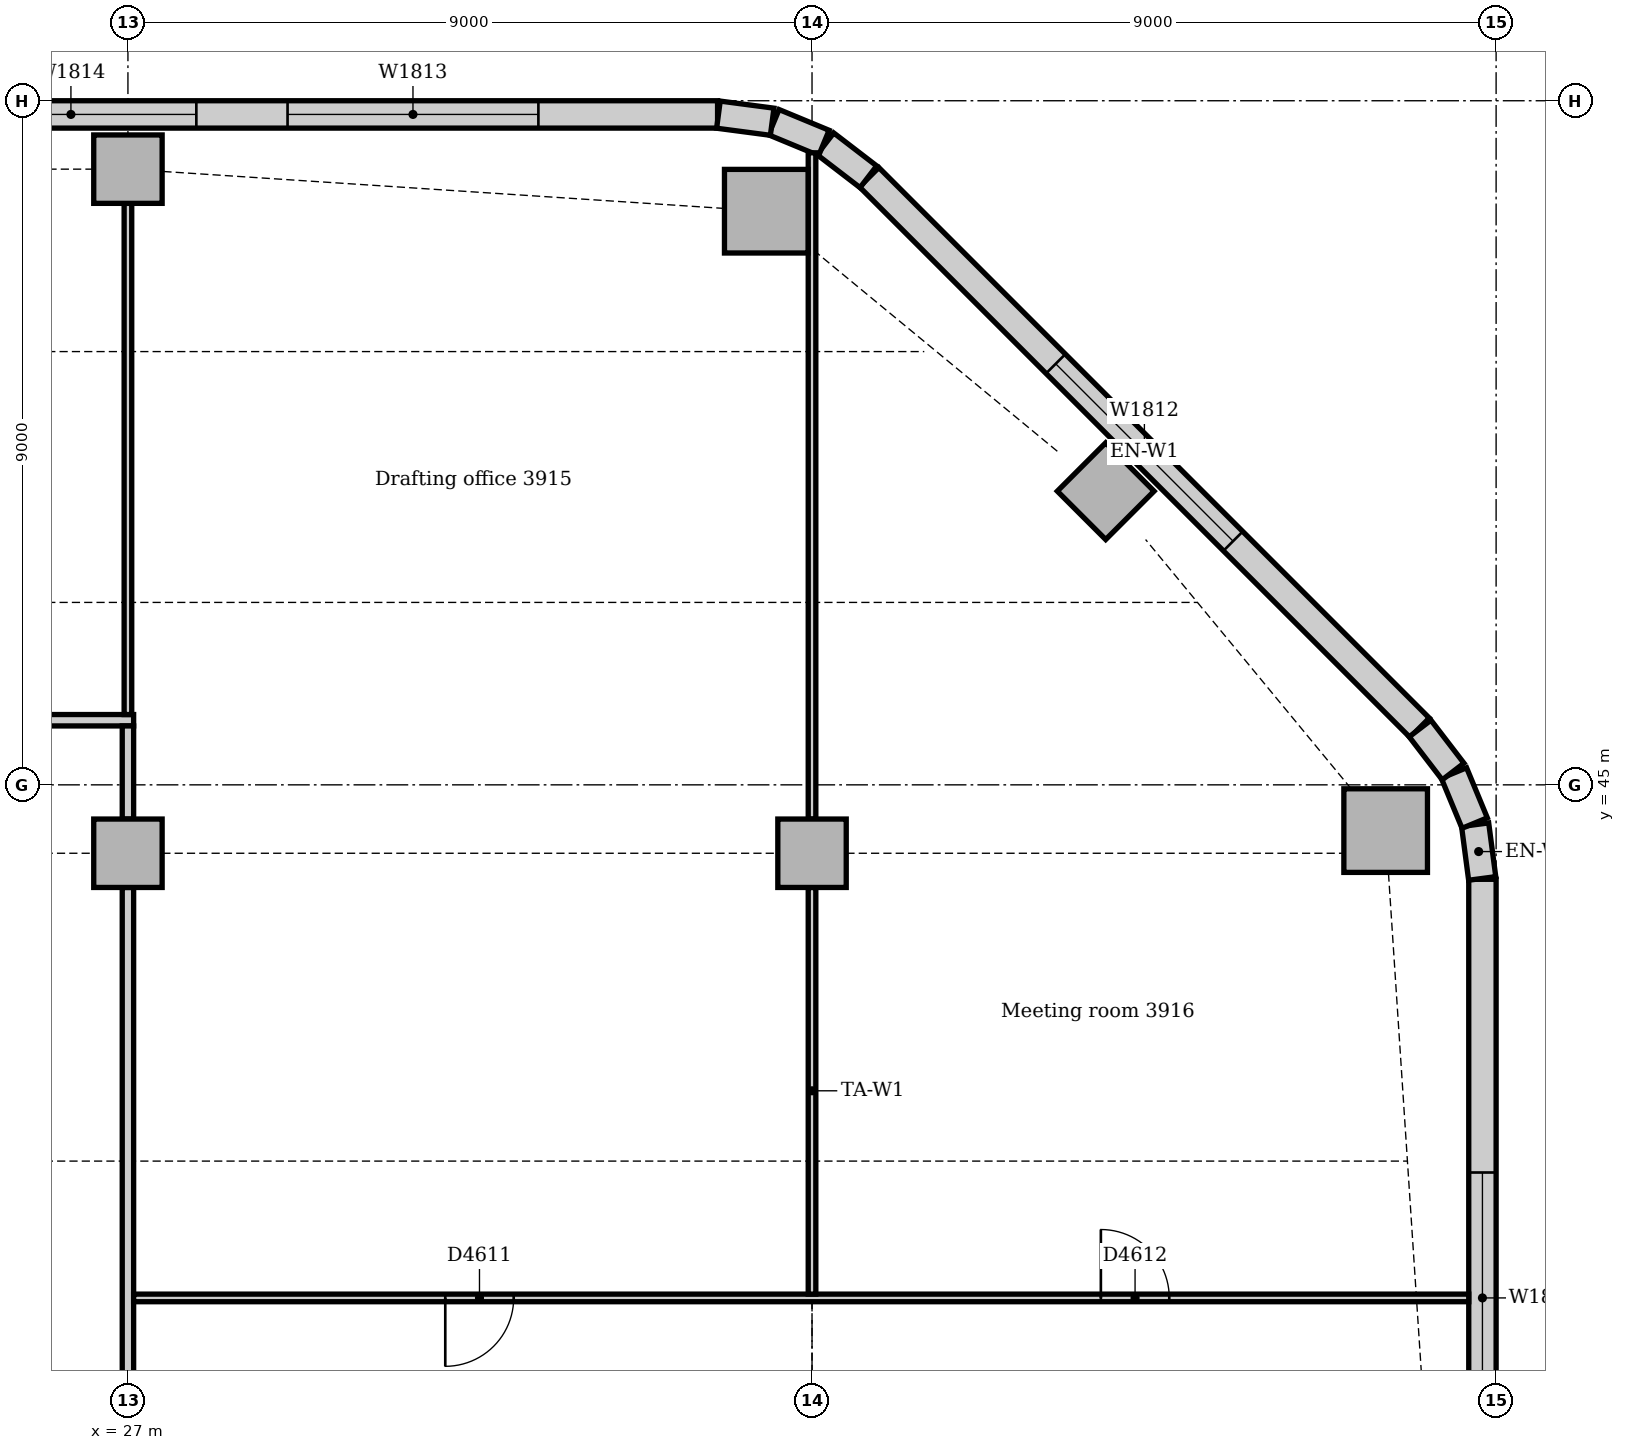
"""IFC4 building model, lengths in metres.
Left out: names, types, materials, properties, quantities, classifications, styles, units other than length and angle.
Written with IfcOpenShell. Run it as: python <this file> out.ifc"""

import sys

from ifc_helpers import new_model, si_unit, direction, frame, frame_2d, origin, origin_2d, place, context, subcontext, project, spatial, rectangle, extrude, element, fill, save


model = new_model("IFC4")
c1 = context("Model", 3, precision=1e-05, world=origin(), true_north=direction((0.0, 1.0)))
c2 = subcontext(c1, "Body", "Model", "MODEL_VIEW")
j1 = project(units=[si_unit("LENGTHUNIT", "METRE"), si_unit("PLANEANGLEUNIT", "RADIAN")], contexts=[c1])
p1 = place(None, origin())
s1 = spatial("IfcSite", under=j1, at=p1, CompositionType="ELEMENT")
p2 = place(p1, origin())
s2 = spatial("IfcBuilding", under=s1, at=p2, CompositionType="ELEMENT")
p3 = place(p2, frame((0.0, 0.0, 165.0)))
s3 = spatial("IfcBuildingStorey", under=s2, at=p3, CompositionType="ELEMENT", Elevation=165.0)
for number, where, z_axis, x_axis in (
    (1, (43.547, 44.398, 0.0), (0.0, 0.0, 1.0), (1.0, 0.0, 0.0)),
    (2, (35.398, 52.547, 0.0), (0.0, 0.0, 1.0), (1.0, 0.0, 0.0)),
):
    element("IfcColumn", number, at=place(p3, frame(where, z_axis=z_axis, x_axis=x_axis)), inside=s3, PredefinedType="COLUMN", context=c2, shape_type="SweptSolid", body=[
        extrude(rectangle(XDim=1.1, YDim=1.1, at=origin_2d()), origin(), (0.0, 0.0, 1.0), 3.85),
    ])
for number, where, z_axis, x_axis in (
    (3, (39.864, 48.864, 0.0), (0.0, 0.0, 1.0), (0.707, 0.707, 0.0)),
    (4, (27.0, 53.1, 0.0), (0.0, 0.0, 1.0), (1.0, 0.0, 0.0)),
    (5, (27.0, 44.1, 0.0), (0.0, 0.0, 1.0), (1.0, 0.0, 0.0)),
    (6, (36.0, 44.1, 0.0), (0.0, 0.0, 1.0), (1.0, 0.0, 0.0)),
):
    element("IfcColumn", number, at=place(p3, frame(where, z_axis=z_axis, x_axis=x_axis)), inside=s3, PredefinedType="COLUMN", context=c2, shape_type="SweptSolid", body=[
        extrude(rectangle(XDim=0.9, YDim=0.9, at=origin_2d()), origin(), (0.0, 0.0, 1.0), 3.85),
    ])
p4 = place(p3, frame((44.82, 19.243, 0.0), z_axis=(0.0, 0.0, 1.0), x_axis=(0.0, 1.0, 0.0)))
e7 = element("IfcWall", 7, at=p4, inside=s3, PredefinedType="STANDARD", context=c2, shape_type="SweptSolid", body=[
    extrude(rectangle(XDim=24.515, YDim=0.36, at=frame_2d((12.257, 0.0))), origin(), (0.0, 0.0, 1.0), 3.85),
])
p5 = place(p4, frame((3.507, 0.0, 0.9)))
e8 = element("IfcOpeningElement", 8, at=p5, cuts=e7, PredefinedType="OPENING", context=c2, shape_type="SweptSolid", body=[
    extrude(rectangle(XDim=3.3, YDim=1.6, at=frame_2d((1.65, 0.8))), frame((0.0, 0.19, 0.0), z_axis=(0.0, -1.0, 0.0), x_axis=(1.0, 0.0, 0.0)), (0.0, 0.0, 1.0), 0.38),
])
p6 = place(p4, frame((8.357, 0.0, 0.9)))
e9 = element("IfcOpeningElement", 9, at=p6, cuts=e7, PredefinedType="OPENING", context=c2, shape_type="SweptSolid", body=[
    extrude(rectangle(XDim=3.3, YDim=1.6, at=frame_2d((1.65, 0.8))), frame((0.0, 0.19, 0.0), z_axis=(0.0, -1.0, 0.0), x_axis=(1.0, 0.0, 0.0)), (0.0, 0.0, 1.0), 0.38),
])
p7 = place(p4, frame((12.857, 0.0, 0.9)))
e10 = element("IfcOpeningElement", 10, at=p7, cuts=e7, PredefinedType="OPENING", context=c2, shape_type="SweptSolid", body=[
    extrude(rectangle(XDim=3.3, YDim=1.6, at=frame_2d((1.65, 0.8))), frame((0.0, 0.19, 0.0), z_axis=(0.0, -1.0, 0.0), x_axis=(1.0, 0.0, 0.0)), (0.0, 0.0, 1.0), 0.38),
])
p8 = place(p4, frame((17.357, 0.0, 0.9)))
e11 = element("IfcOpeningElement", 11, at=p8, cuts=e7, PredefinedType="OPENING", context=c2, shape_type="SweptSolid", body=[
    extrude(rectangle(XDim=3.3, YDim=1.6, at=frame_2d((1.65, 0.8))), frame((0.0, 0.19, 0.0), z_axis=(0.0, -1.0, 0.0), x_axis=(1.0, 0.0, 0.0)), (0.0, 0.0, 1.0), 0.38),
])
p9 = place(p3, frame((43.994, 45.751, 0.0), z_axis=(0.0, 0.0, 1.0), x_axis=(-0.707106781187, 0.707106781187, 0.0)))
e12 = element("IfcWall", 12, at=p9, inside=s3, PredefinedType="STANDARD", context=c2, shape_type="SweptSolid", body=[
    extrude(rectangle(XDim=10.243, YDim=0.36, at=frame_2d((5.121, 0.0))), origin(), (0.0, 0.0, 1.0), 3.85),
])
p10 = place(p9, frame((3.471, 0.0, 0.9)))
e13 = element("IfcOpeningElement", 13, at=p10, cuts=e12, PredefinedType="OPENING", context=c2, shape_type="SweptSolid", body=[
    extrude(rectangle(XDim=3.3, YDim=1.6, at=frame_2d((1.65, 0.8))), frame((0.0, 0.19, 0.0), z_axis=(0.0, -1.0, 0.0), x_axis=(1.0, 0.0, 0.0)), (0.0, 0.0, 1.0), 0.38),
])
p11 = place(p3, frame((34.757, 53.82, 0.0), z_axis=(0.0, 0.0, 1.0), x_axis=(-1.0, 0.0, 0.0)))
e14 = element("IfcWall", 14, at=p11, inside=s3, PredefinedType="STANDARD", context=c2, shape_type="SweptSolid", body=[
    extrude(rectangle(XDim=30.515, YDim=0.36, at=frame_2d((15.257, 0.0))), origin(), (0.0, 0.0, 1.0), 3.85),
])
p12 = place(p11, frame((2.357, 0.0, 0.9)))
e15 = element("IfcOpeningElement", 15, at=p12, cuts=e14, PredefinedType="OPENING", context=c2, shape_type="SweptSolid", body=[
    extrude(rectangle(XDim=3.3, YDim=1.6, at=frame_2d((1.65, 0.8))), frame((0.0, 0.19, 0.0), z_axis=(0.0, -1.0, 0.0), x_axis=(1.0, 0.0, 0.0)), (0.0, 0.0, 1.0), 0.38),
])
p13 = place(p11, frame((6.857, 0.0, 0.9)))
e16 = element("IfcOpeningElement", 16, at=p13, cuts=e14, PredefinedType="OPENING", context=c2, shape_type="SweptSolid", body=[
    extrude(rectangle(XDim=3.3, YDim=1.6, at=frame_2d((1.65, 0.8))), frame((0.0, 0.19, 0.0), z_axis=(0.0, -1.0, 0.0), x_axis=(1.0, 0.0, 0.0)), (0.0, 0.0, 1.0), 0.38),
])
p14 = place(p11, frame((11.357, 0.0, 0.9)))
e17 = element("IfcOpeningElement", 17, at=p14, cuts=e14, PredefinedType="OPENING", context=c2, shape_type="SweptSolid", body=[
    extrude(rectangle(XDim=3.3, YDim=1.6, at=frame_2d((1.65, 0.8))), frame((0.0, 0.19, 0.0), z_axis=(0.0, -1.0, 0.0), x_axis=(1.0, 0.0, 0.0)), (0.0, 0.0, 1.0), 0.38),
])
p15 = place(p11, frame((15.857, 0.0, 0.9)))
e18 = element("IfcOpeningElement", 18, at=p15, cuts=e14, PredefinedType="OPENING", context=c2, shape_type="SweptSolid", body=[
    extrude(rectangle(XDim=3.3, YDim=1.6, at=frame_2d((1.65, 0.8))), frame((0.0, 0.19, 0.0), z_axis=(0.0, -1.0, 0.0), x_axis=(1.0, 0.0, 0.0)), (0.0, 0.0, 1.0), 0.38),
])
p16 = place(p11, frame((20.357, 0.0, 0.9)))
e19 = element("IfcOpeningElement", 19, at=p16, cuts=e14, PredefinedType="OPENING", context=c2, shape_type="SweptSolid", body=[
    extrude(rectangle(XDim=3.3, YDim=1.6, at=frame_2d((1.65, 0.8))), frame((0.0, 0.19, 0.0), z_axis=(0.0, -1.0, 0.0), x_axis=(1.0, 0.0, 0.0)), (0.0, 0.0, 1.0), 0.38),
])
p17 = place(p11, frame((24.857, 0.0, 0.9)))
e20 = element("IfcOpeningElement", 20, at=p17, cuts=e14, PredefinedType="OPENING", context=c2, shape_type="SweptSolid", body=[
    extrude(rectangle(XDim=3.3, YDim=1.6, at=frame_2d((1.65, 0.8))), frame((0.0, 0.19, 0.0), z_axis=(0.0, -1.0, 0.0), x_axis=(1.0, 0.0, 0.0)), (0.0, 0.0, 1.0), 0.38),
])
for number, where, z_axis, x_axis in (
    (21, (44.817, 43.769, 0.0), (0.0, 0.0, 1.0), (-0.131, 0.991, 0.0)),
    (22, (44.718, 44.497, 0.0), (0.0, 0.0, 1.0), (-0.383, 0.924, 0.0)),
):
    element("IfcWall", number, at=place(p3, frame(where, z_axis=z_axis, x_axis=x_axis)), inside=s3, PredefinedType="STANDARD", context=c2, shape_type="SweptSolid", body=[
        extrude(rectangle(XDim=0.713, YDim=0.36, at=frame_2d((0.356, 0.0))), origin(), (0.0, 0.0, 1.0), 3.85),
    ])
for number, where, z_axis, x_axis in (
    (23, (44.434, 45.175, 0.0), (0.0, 0.0, 1.0), (-0.609, 0.793, 0.0)),
    (24, (36.741, 53.0, 0.0), (0.0, 0.0, 1.0), (-0.793, 0.609, 0.0)),
):
    element("IfcWall", number, at=place(p3, frame(where, z_axis=z_axis, x_axis=x_axis)), inside=s3, PredefinedType="STANDARD", context=c2, shape_type="SweptSolid", body=[
        extrude(rectangle(XDim=0.713, YDim=0.36, at=frame_2d((0.357, 0.0))), origin(), (0.0, 0.0, 1.0), 3.85),
    ])
for number, where, z_axis, x_axis in (
    (25, (36.156, 53.445, 0.0), (0.0, 0.0, 1.0), (-0.924, 0.383, 0.0)),
    (26, (35.476, 53.724, 0.0), (0.0, 0.0, 1.0), (-0.991, 0.131, 0.0)),
):
    element("IfcWall", number, at=place(p3, frame(where, z_axis=z_axis, x_axis=x_axis)), inside=s3, PredefinedType="STANDARD", context=c2, shape_type="SweptSolid", body=[
        extrude(rectangle(XDim=0.713, YDim=0.36, at=frame_2d((0.356, 0.0))), origin(), (0.0, 0.0, 1.0), 3.85),
    ])
p18 = place(p3, frame((1.903, 45.85, 0.0), z_axis=(0.0, 0.0, 1.0), x_axis=(1.0, 0.0, 0.0)))
e27 = element("IfcWall", 27, at=p18, inside=s3, PredefinedType="PARTITIONING", context=c2, shape_type="SweptSolid", body=[
    extrude(rectangle(XDim=25.172, YDim=0.15, at=frame_2d((12.586, 0.0))), origin(), (0.0, 0.0, 1.0), 3.85),
])
p19 = place(p18, frame((3.1, 0.0, 0.0)))
e28 = element("IfcOpeningElement", 28, at=p19, cuts=e27, PredefinedType="OPENING", context=c2, shape_type="SweptSolid", body=[
    extrude(rectangle(XDim=1.0, YDim=2.1, at=frame_2d((0.5, 1.05))), frame((0.0, 0.085, 0.0), z_axis=(0.0, -1.0, 0.0), x_axis=(1.0, 0.0, 0.0)), (0.0, 0.0, 1.0), 0.17),
])
p20 = place(p18, frame((11.147, 0.0, 0.0)))
e29 = element("IfcOpeningElement", 29, at=p20, cuts=e27, PredefinedType="OPENING", context=c2, shape_type="SweptSolid", body=[
    extrude(rectangle(XDim=0.9, YDim=2.1, at=frame_2d((0.45, 1.05))), frame((0.0, 0.085, 0.0), z_axis=(0.0, -1.0, 0.0), x_axis=(1.0, 0.0, 0.0)), (0.0, 0.0, 1.0), 0.17),
])
p21 = place(p18, frame((17.897, 0.0, 0.0)))
e30 = element("IfcOpeningElement", 30, at=p21, cuts=e27, PredefinedType="OPENING", context=c2, shape_type="SweptSolid", body=[
    extrude(rectangle(XDim=0.9, YDim=2.1, at=frame_2d((0.45, 1.05))), frame((0.0, 0.085, 0.0), z_axis=(0.0, -1.0, 0.0), x_axis=(1.0, 0.0, 0.0)), (0.0, 0.0, 1.0), 0.17),
])
p22 = place(p3, frame((27.0, 36.45, 0.0), z_axis=(0.0, 0.0, 1.0), x_axis=(0.0, 1.0, 0.0)))
e31 = element("IfcWall", 31, at=p22, inside=s3, PredefinedType="PARTITIONING", context=c2, shape_type="SweptSolid", body=[
    extrude(rectangle(XDim=7.2, YDim=0.15, at=frame_2d((3.6, 0.0))), origin(), (0.0, 0.0, 1.0), 3.362),
])
p23 = place(p3, frame((27.0, 44.55, 0.0), z_axis=(0.0, 0.0, 1.0), x_axis=(0.0, 1.0, 0.0)))
e32 = element("IfcWall", 32, at=p23, inside=s3, PredefinedType="PARTITIONING", context=c2, shape_type="SweptSolid", body=[
    extrude(rectangle(XDim=1.225, YDim=0.15, at=frame_2d((0.613, 0.0))), origin(), (0.0, 0.0, 1.0), 3.362),
])
p24 = place(p3, frame((27.075, 38.25, 0.0), z_axis=(0.0, 0.0, 1.0), x_axis=(1.0, 0.0, 0.0)))
e33 = element("IfcWall", 33, at=p24, inside=s3, PredefinedType="PARTITIONING", context=c2, shape_type="SweptSolid", body=[
    extrude(rectangle(XDim=17.565, YDim=0.1, at=frame_2d((8.783, 0.0))), origin(), (0.0, 0.0, 1.0), 3.85),
])
p25 = place(p24, frame((4.1, 0.0, 0.0)))
e34 = element("IfcOpeningElement", 34, at=p25, cuts=e33, PredefinedType="OPENING", context=c2, shape_type="SweptSolid", body=[
    extrude(rectangle(XDim=0.9, YDim=2.1, at=frame_2d((0.45, 1.05))), frame((0.0, 0.06, 0.0), z_axis=(0.0, -1.0, 0.0), x_axis=(1.0, 0.0, 0.0)), (0.0, 0.0, 1.0), 0.12),
])
p26 = place(p24, frame((12.725, 0.0, 0.0)))
e35 = element("IfcOpeningElement", 35, at=p26, cuts=e33, PredefinedType="OPENING", context=c2, shape_type="SweptSolid", body=[
    extrude(rectangle(XDim=0.9, YDim=2.1, at=frame_2d((0.45, 1.05))), frame((0.0, 0.06, 0.0), z_axis=(0.0, -1.0, 0.0), x_axis=(1.0, 0.0, 0.0)), (0.0, 0.0, 1.0), 0.12),
])
p27 = place(p3, frame((36.0, 38.3, 0.0), z_axis=(0.0, 0.0, 1.0), x_axis=(0.0, 1.0, 0.0)))
e36 = element("IfcWall", 36, at=p27, inside=s3, PredefinedType="PARTITIONING", context=c2, shape_type="SweptSolid", body=[
    extrude(rectangle(XDim=5.35, YDim=0.1, at=frame_2d((2.675, 0.0))), origin(), (0.0, 0.0, 1.0), 3.362),
])
p28 = place(p3, frame((36.0, 44.55, 0.0), z_axis=(0.0, 0.0, 1.0), x_axis=(0.0, 1.0, 0.0)))
e37 = element("IfcWall", 37, at=p28, inside=s3, PredefinedType="PARTITIONING", context=c2, shape_type="SweptSolid", body=[
    extrude(rectangle(XDim=8.765, YDim=0.1, at=frame_2d((4.383, 0.0))), origin(), (0.0, 0.0, 1.0), 3.362),
])
p29 = place(p3, frame((27.0, 45.925, 0.0), z_axis=(0.0, 0.0, 1.0), x_axis=(0.0, 1.0, 0.0)))
e38 = element("IfcWall", 38, at=p29, inside=s3, PredefinedType="PARTITIONING", context=c2, shape_type="SweptSolid", body=[
    extrude(rectangle(XDim=6.725, YDim=0.1, at=frame_2d((3.362, 0.0))), origin(), (0.0, 0.0, 1.0), 3.362),
])
p30 = place(p8, origin())
e39 = element("IfcWindow", 39, at=p30, inside=s3, PartitioningType="SINGLE_PANEL", PredefinedType="WINDOW", context=c2, shape_type="SweptSolid", body=[
    extrude(rectangle(XDim=3.3, YDim=1.6, at=frame_2d((1.65, 0.8))), frame((0.0, 0.13, 0.0), z_axis=(0.0, -1.0, 0.0), x_axis=(1.0, 0.0, 0.0)), (0.0, 0.0, 1.0), 0.06),
])
fill(e11, e39)
p31 = place(p10, origin())
e40 = element("IfcWindow", 40, at=p31, inside=s3, PartitioningType="SINGLE_PANEL", PredefinedType="WINDOW", context=c2, shape_type="SweptSolid", body=[
    extrude(rectangle(XDim=3.3, YDim=1.6, at=frame_2d((1.65, 0.8))), frame((0.0, 0.13, 0.0), z_axis=(0.0, -1.0, 0.0), x_axis=(1.0, 0.0, 0.0)), (0.0, 0.0, 1.0), 0.06),
])
fill(e13, e40)
p32 = place(p12, origin())
e41 = element("IfcWindow", 41, at=p32, inside=s3, PartitioningType="SINGLE_PANEL", PredefinedType="WINDOW", context=c2, shape_type="SweptSolid", body=[
    extrude(rectangle(XDim=3.3, YDim=1.6, at=frame_2d((1.65, 0.8))), frame((0.0, 0.13, 0.0), z_axis=(0.0, -1.0, 0.0), x_axis=(1.0, 0.0, 0.0)), (0.0, 0.0, 1.0), 0.06),
])
fill(e15, e41)
p33 = place(p13, origin())
e42 = element("IfcWindow", 42, at=p33, inside=s3, PartitioningType="SINGLE_PANEL", PredefinedType="WINDOW", context=c2, shape_type="SweptSolid", body=[
    extrude(rectangle(XDim=3.3, YDim=1.6, at=frame_2d((1.65, 0.8))), frame((0.0, 0.13, 0.0), z_axis=(0.0, -1.0, 0.0), x_axis=(1.0, 0.0, 0.0)), (0.0, 0.0, 1.0), 0.06),
])
fill(e16, e42)
p34 = place(p25, frame((0.9, 0.0, 0.0), z_axis=(0.0, 0.0, 1.0), x_axis=(-1.0, 0.0, 0.0)))
e43 = element("IfcDoor", 43, at=p34, inside=s3, OperationType="SINGLE_SWING_RIGHT", PredefinedType="DOOR", context=c2, shape_type="SweptSolid", body=[
    extrude(rectangle(XDim=0.9, YDim=2.1, at=frame_2d((0.45, 1.05))), frame((0.0, 0.025, 0.0), z_axis=(0.0, -1.0, 0.0), x_axis=(1.0, 0.0, 0.0)), (0.0, 0.0, 1.0), 0.05),
])
fill(e34, e43)
p35 = place(p26, origin())
e44 = element("IfcDoor", 44, at=p35, inside=s3, OperationType="SINGLE_SWING_LEFT", PredefinedType="DOOR", context=c2, shape_type="SweptSolid", body=[
    extrude(rectangle(XDim=0.9, YDim=2.1, at=frame_2d((0.45, 1.05))), frame((0.0, 0.025, 0.0), z_axis=(0.0, -1.0, 0.0), x_axis=(1.0, 0.0, 0.0)), (0.0, 0.0, 1.0), 0.05),
])
fill(e35, e44)
save(model, sys.argv[1])
